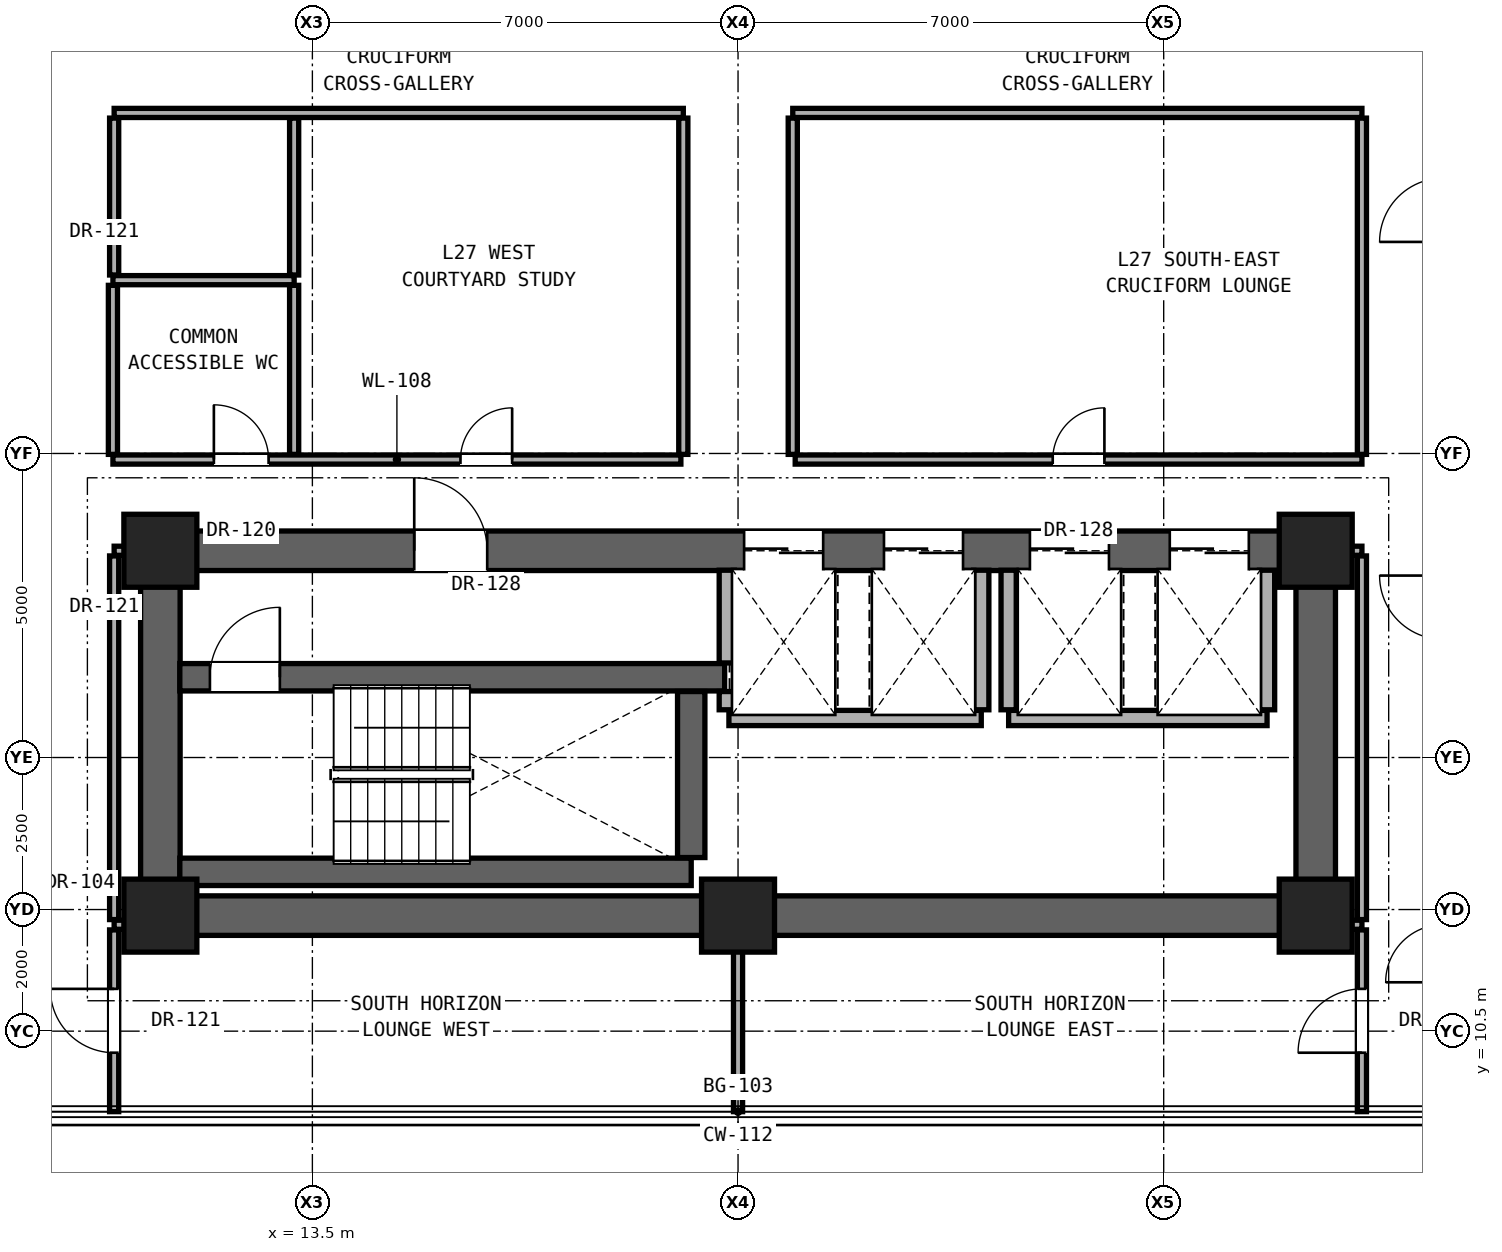
"""IFC4 building model, lengths in metres.
Left out: names, types, materials, properties, quantities, classifications, styles, units other than length and angle.
Written with IfcOpenShell. Run it as: python <this file> out.ifc"""

import sys

from ifc_helpers import new_model, si_unit, direction, frame, frame_2d, origin, origin_2d, place, context, subcontext, project, spatial, rectangle, extrude, element, fill, save


model = new_model("IFC4")
c1 = context("Model", 3, precision=1e-05, world=origin(), true_north=direction((0.0, 1.0)))
c2 = subcontext(c1, "Body", "Model", "MODEL_VIEW")
j1 = project(units=[si_unit("LENGTHUNIT", "METRE"), si_unit("PLANEANGLEUNIT", "RADIAN")], contexts=[c1])
p1 = place(None, origin())
s1 = spatial("IfcSite", under=j1, at=p1, CompositionType="ELEMENT")
p2 = place(p1, origin())
s2 = spatial("IfcBuilding", under=s1, at=p2, CompositionType="ELEMENT")
p3 = place(p2, frame((0.0, 0.0, 98.3)))
s3 = spatial("IfcBuildingStorey", under=s2, at=p3, CompositionType="ELEMENT", Elevation=98.3)
for number, where, z_axis, x_axis in (
    (1, (11.0, 12.4, 0.0), (0.0, 0.0, 1.0), (1.0, 0.0, 0.0)),
    (2, (20.5, 12.4, 0.0), (0.0, 0.0, 1.0), (1.0, 0.0, 0.0)),
    (3, (30.0, 12.4, 0.0), (0.0, 0.0, 1.0), (1.0, 0.0, 0.0)),
    (4, (11.0, 18.4, 0.0), (0.0, 0.0, 1.0), (1.0, 0.0, 0.0)),
    (5, (30.0, 18.4, 0.0), (0.0, 0.0, 1.0), (1.0, 0.0, 0.0)),
):
    element("IfcColumn", number, at=place(p3, frame(where, z_axis=z_axis, x_axis=x_axis)), inside=s3, PredefinedType="COLUMN", context=c2, shape_type="SweptSolid", body=[
        extrude(rectangle(XDim=1.2, YDim=1.2, at=origin_2d()), origin(), (0.0, 0.0, 1.0), 3.3),
    ])
p4 = place(p3, frame((11.0, 12.4, 0.0), z_axis=(0.0, 0.0, 1.0), x_axis=(1.0, 0.0, 0.0)))
e6 = element("IfcWall", 6, at=p4, inside=s3, PredefinedType="SHEAR", context=c2, shape_type="SweptSolid", body=[
    extrude(rectangle(XDim=19.0, YDim=0.65, at=frame_2d((9.5, 0.0))), origin(), (0.0, 0.0, 1.0), 3.08),
])
for number, where, z_axis, x_axis in (
    (7, (11.0, 12.4, 0.0), (0.0, 0.0, 1.0), (0.0, 1.0, 0.0)),
    (8, (30.0, 12.4, 0.0), (0.0, 0.0, 1.0), (0.0, 1.0, 0.0)),
):
    element("IfcWall", number, at=place(p3, frame(where, z_axis=z_axis, x_axis=x_axis)), inside=s3, PredefinedType="SHEAR", context=c2, shape_type="SweptSolid", body=[
        extrude(rectangle(XDim=6.0, YDim=0.65, at=frame_2d((3.0, 0.0))), origin(), (0.0, 0.0, 1.0), 3.08),
    ])
p5 = place(p3, frame((11.0, 18.4, 0.0), z_axis=(0.0, 0.0, 1.0), x_axis=(1.0, 0.0, 0.0)))
e9 = element("IfcWall", 9, at=p5, inside=s3, PredefinedType="SHEAR", context=c2, shape_type="SweptSolid", body=[
    extrude(rectangle(XDim=19.0, YDim=0.65, at=frame_2d((9.5, 0.0))), origin(), (0.0, 0.0, 1.0), 3.08),
])
p6 = place(p5, frame((4.175, 0.0, 0.0)))
e10 = element("IfcOpeningElement", 10, at=p6, cuts=e9, PredefinedType="OPENING", context=c2, shape_type="SweptSolid", body=[
    extrude(rectangle(XDim=1.2, YDim=2.25, at=frame_2d((0.6, 1.125))), frame((0.0, 0.335, 0.0), z_axis=(0.0, -1.0, 0.0), x_axis=(1.0, 0.0, 0.0)), (0.0, 0.0, 1.0), 0.67),
])
p7 = place(p5, frame((9.6, 0.0, 0.0)))
e11 = element("IfcOpeningElement", 11, at=p7, cuts=e9, PredefinedType="OPENING", context=c2, shape_type="SweptSolid", body=[
    extrude(rectangle(XDim=1.3, YDim=2.3, at=frame_2d((0.65, 1.15))), frame((0.0, 0.335, 0.0), z_axis=(0.0, -1.0, 0.0), x_axis=(1.0, 0.0, 0.0)), (0.0, 0.0, 1.0), 0.67),
])
p8 = place(p5, frame((11.9, 0.0, 0.0)))
e12 = element("IfcOpeningElement", 12, at=p8, cuts=e9, PredefinedType="OPENING", context=c2, shape_type="SweptSolid", body=[
    extrude(rectangle(XDim=1.3, YDim=2.3, at=frame_2d((0.65, 1.15))), frame((0.0, 0.335, 0.0), z_axis=(0.0, -1.0, 0.0), x_axis=(1.0, 0.0, 0.0)), (0.0, 0.0, 1.0), 0.67),
])
p9 = place(p5, frame((14.3, 0.0, 0.0)))
e13 = element("IfcOpeningElement", 13, at=p9, cuts=e9, PredefinedType="OPENING", context=c2, shape_type="SweptSolid", body=[
    extrude(rectangle(XDim=1.3, YDim=2.3, at=frame_2d((0.65, 1.15))), frame((0.0, 0.335, 0.0), z_axis=(0.0, -1.0, 0.0), x_axis=(1.0, 0.0, 0.0)), (0.0, 0.0, 1.0), 0.67),
])
p10 = place(p5, frame((16.6, 0.0, 0.0)))
e14 = element("IfcOpeningElement", 14, at=p10, cuts=e9, PredefinedType="OPENING", context=c2, shape_type="SweptSolid", body=[
    extrude(rectangle(XDim=1.3, YDim=2.3, at=frame_2d((0.65, 1.15))), frame((0.0, 0.335, 0.0), z_axis=(0.0, -1.0, 0.0), x_axis=(1.0, 0.0, 0.0)), (0.0, 0.0, 1.0), 0.67),
])
for number, where, z_axis, x_axis in (
    (15, (10.24, 12.25, 0.0), (0.0, 0.0, 1.0), (1.0, 0.0, 0.0)),
    (16, (30.32, 12.25, 0.0), (0.0, 0.0, 1.0), (1.0, 0.0, 0.0)),
):
    element("IfcWall", number, at=place(p3, frame(where, z_axis=z_axis, x_axis=x_axis)), inside=s3, PredefinedType="PARTITIONING", context=c2, shape_type="SweptSolid", body=[
        extrude(rectangle(XDim=0.44, YDim=0.15, at=frame_2d((0.22, 0.0))), origin(), (0.0, 0.0, 1.0), 3.08),
    ])
p11 = place(p3, frame((11.32, 13.12, 0.0), z_axis=(0.0, 0.0, 1.0), x_axis=(1.0, 0.0, 0.0)))
e17 = element("IfcWall", 17, at=p11, inside=s3, PredefinedType="SHEAR", context=c2, shape_type="SweptSolid", body=[
    extrude(rectangle(XDim=8.41, YDim=0.45, at=frame_2d((4.205, 0.0))), origin(), (0.0, 0.0, 1.0), 3.08),
])
p12 = place(p3, frame((20.35, 15.65, 0.0), z_axis=(0.0, 0.0, 1.0), x_axis=(1.0, 0.0, 0.0)))
e18 = element("IfcWall", 18, at=p12, inside=s3, PredefinedType="SOLIDWALL", context=c2, shape_type="SweptSolid", body=[
    extrude(rectangle(XDim=4.15, YDim=0.25, at=frame_2d((2.075, 0.0))), origin(), (0.0, 0.0, 1.0), 3.08),
])
p13 = place(p3, frame((24.95, 15.65, 0.0), z_axis=(0.0, 0.0, 1.0), x_axis=(1.0, 0.0, 0.0)))
e19 = element("IfcWall", 19, at=p13, inside=s3, PredefinedType="SOLIDWALL", context=c2, shape_type="SweptSolid", body=[
    extrude(rectangle(XDim=4.25, YDim=0.25, at=frame_2d((2.125, 0.0))), origin(), (0.0, 0.0, 1.0), 3.08),
])
p14 = place(p3, frame((11.32, 16.32, 0.0), z_axis=(0.0, 0.0, 1.0), x_axis=(1.0, 0.0, 0.0)))
e20 = element("IfcWall", 20, at=p14, inside=s3, PredefinedType="SHEAR", context=c2, shape_type="SweptSolid", body=[
    extrude(rectangle(XDim=8.96, YDim=0.45, at=frame_2d((4.48, 0.0))), origin(), (0.0, 0.0, 1.0), 3.08),
])
p15 = place(p14, frame((0.495, 0.0, 0.0)))
e21 = element("IfcOpeningElement", 21, at=p15, cuts=e20, PredefinedType="OPENING", context=c2, shape_type="SweptSolid", body=[
    extrude(rectangle(XDim=1.15, YDim=2.2, at=frame_2d((0.575, 1.1))), frame((0.0, 0.235, 0.0), z_axis=(0.0, -1.0, 0.0), x_axis=(1.0, 0.0, 0.0)), (0.0, 0.0, 1.0), 0.47),
])
for number, where, z_axis, x_axis in (
    (22, (10.24, 18.4, 0.0), (0.0, 0.0, 1.0), (1.0, 0.0, 0.0)),
    (23, (30.32, 18.4, 0.0), (0.0, 0.0, 1.0), (1.0, 0.0, 0.0)),
):
    element("IfcWall", number, at=place(p3, frame(where, z_axis=z_axis, x_axis=x_axis)), inside=s3, PredefinedType="PARTITIONING", context=c2, shape_type="SweptSolid", body=[
        extrude(rectangle(XDim=0.44, YDim=0.15, at=frame_2d((0.22, 0.0))), origin(), (0.0, 0.0, 1.0), 2.456),
    ])
p16 = place(p3, frame((10.22, 19.9, 0.0), z_axis=(0.0, 0.0, 1.0), x_axis=(1.0, 0.0, 0.0)))
e24 = element("IfcWall", 24, at=p16, inside=s3, PredefinedType="PARTITIONING", context=c2, shape_type="SweptSolid", body=[
    extrude(rectangle(XDim=9.34, YDim=0.15, at=frame_2d((4.67, 0.0))), origin(), (0.0, 0.0, 1.0), 2.124),
])
p17 = place(p16, frame((1.66, 0.0, 0.0)))
e25 = element("IfcOpeningElement", 25, at=p17, cuts=e24, PredefinedType="OPENING", context=c2, shape_type="SweptSolid", body=[
    extrude(rectangle(XDim=0.9, YDim=2.1, at=frame_2d((0.45, 1.05))), frame((0.0, 0.085, 0.0), z_axis=(0.0, -1.0, 0.0), x_axis=(1.0, 0.0, 0.0)), (0.0, 0.0, 1.0), 0.17),
])
p18 = place(p16, frame((5.715, 0.0, 0.0)))
e26 = element("IfcOpeningElement", 26, at=p18, cuts=e24, PredefinedType="OPENING", context=c2, shape_type="SweptSolid", body=[
    extrude(rectangle(XDim=0.85, YDim=2.01, at=frame_2d((0.425, 1.005))), frame((0.0, 0.085, 0.0), z_axis=(0.0, -1.0, 0.0), x_axis=(1.0, 0.0, 0.0)), (0.0, 0.0, 1.0), 0.17),
])
p19 = place(p3, frame((21.44, 19.9, 0.0), z_axis=(0.0, 0.0, 1.0), x_axis=(1.0, 0.0, 0.0)))
e27 = element("IfcWall", 27, at=p19, inside=s3, PredefinedType="PARTITIONING", context=c2, shape_type="SweptSolid", body=[
    extrude(rectangle(XDim=9.32, YDim=0.15, at=frame_2d((4.66, 0.0))), origin(), (0.0, 0.0, 1.0), 2.124),
])
p20 = place(p19, frame((4.235, 0.0, 0.0)))
e28 = element("IfcOpeningElement", 28, at=p20, cuts=e27, PredefinedType="OPENING", context=c2, shape_type="SweptSolid", body=[
    extrude(rectangle(XDim=0.85, YDim=2.01, at=frame_2d((0.425, 1.005))), frame((0.0, 0.085, 0.0), z_axis=(0.0, -1.0, 0.0), x_axis=(1.0, 0.0, 0.0)), (0.0, 0.0, 1.0), 0.17),
])
p21 = place(p3, frame((10.22, 22.85, 0.0), z_axis=(0.0, 0.0, 1.0), x_axis=(1.0, 0.0, 0.0)))
e29 = element("IfcWall", 29, at=p21, inside=s3, PredefinedType="PARTITIONING", context=c2, shape_type="SweptSolid", body=[
    extrude(rectangle(XDim=2.98, YDim=0.15, at=frame_2d((1.49, 0.0))), origin(), (0.0, 0.0, 1.0), 2.124),
])
for number, where, z_axis, x_axis in (
    (30, (10.24, 25.6, 0.0), (0.0, 0.0, 1.0), (1.0, 0.0, 0.0)),
    (31, (21.4, 25.6, 0.0), (0.0, 0.0, 1.0), (1.0, 0.0, 0.0)),
):
    element("IfcWall", number, at=place(p3, frame(where, z_axis=z_axis, x_axis=x_axis)), inside=s3, PredefinedType="PARTITIONING", context=c2, shape_type="SweptSolid", body=[
        extrude(rectangle(XDim=9.36, YDim=0.15, at=frame_2d((4.68, 0.0))), origin(), (0.0, 0.0, 1.0), 2.124),
    ])
p22 = place(p3, frame((10.22, 19.985, 0.0), z_axis=(0.0, 0.0, 1.0), x_axis=(0.0, 1.0, 0.0)))
e32 = element("IfcWall", 32, at=p22, inside=s3, PredefinedType="PARTITIONING", context=c2, shape_type="SweptSolid", body=[
    extrude(rectangle(XDim=2.78, YDim=0.15, at=frame_2d((1.39, 0.0))), origin(), (0.0, 0.0, 1.0), 3.08),
])
p23 = place(p3, frame((10.24, 9.176, 0.0), z_axis=(0.0, 0.0, 1.0), x_axis=(0.0, 1.0, 0.0)))
e33 = element("IfcWall", 33, at=p23, inside=s3, PredefinedType="PARTITIONING", context=c2, shape_type="SweptSolid", body=[
    extrude(rectangle(XDim=2.989, YDim=0.15, at=frame_2d((1.495, 0.0))), origin(), (0.0, 0.0, 1.0), 3.08),
])
p24 = place(p23, frame((0.969, 0.0, 0.0)))
e34 = element("IfcOpeningElement", 34, at=p24, cuts=e33, PredefinedType="OPENING", context=c2, shape_type="SweptSolid", body=[
    extrude(rectangle(XDim=1.05, YDim=2.2, at=frame_2d((0.525, 1.1))), frame((0.0, 0.085, 0.0), z_axis=(0.0, -1.0, 0.0), x_axis=(1.0, 0.0, 0.0)), (0.0, 0.0, 1.0), 0.17),
])
p25 = place(p3, frame((10.24, 12.335, 0.0), z_axis=(0.0, 0.0, 1.0), x_axis=(0.0, 1.0, 0.0)))
e35 = element("IfcWall", 35, at=p25, inside=s3, PredefinedType="PARTITIONING", context=c2, shape_type="SweptSolid", body=[
    extrude(rectangle(XDim=5.98, YDim=0.15, at=frame_2d((2.99, 0.0))), origin(), (0.0, 0.0, 1.0), 2.456),
])
p26 = place(p3, frame((10.24, 22.935, 0.0), z_axis=(0.0, 0.0, 1.0), x_axis=(0.0, 1.0, 0.0)))
e36 = element("IfcWall", 36, at=p26, inside=s3, PredefinedType="PARTITIONING", context=c2, shape_type="SweptSolid", body=[
    extrude(rectangle(XDim=2.58, YDim=0.15, at=frame_2d((1.29, 0.0))), origin(), (0.0, 0.0, 1.0), 2.299),
])
p27 = place(p3, frame((13.2, 19.985, 0.0), z_axis=(0.0, 0.0, 1.0), x_axis=(0.0, 1.0, 0.0)))
e37 = element("IfcWall", 37, at=p27, inside=s3, PredefinedType="PARTITIONING", context=c2, shape_type="SweptSolid", body=[
    extrude(rectangle(XDim=2.78, YDim=0.15, at=frame_2d((1.39, 0.0))), origin(), (0.0, 0.0, 1.0), 3.08),
])
p28 = place(p3, frame((13.2, 22.935, 0.0), z_axis=(0.0, 0.0, 1.0), x_axis=(0.0, 1.0, 0.0)))
e38 = element("IfcWall", 38, at=p28, inside=s3, PredefinedType="PARTITIONING", context=c2, shape_type="SweptSolid", body=[
    extrude(rectangle(XDim=2.58, YDim=0.15, at=frame_2d((1.29, 0.0))), origin(), (0.0, 0.0, 1.0), 2.124),
])
p29 = place(p3, frame((19.6, 19.985, 0.0), z_axis=(0.0, 0.0, 1.0), x_axis=(0.0, 1.0, 0.0)))
e39 = element("IfcWall", 39, at=p29, inside=s3, PredefinedType="PARTITIONING", context=c2, shape_type="SweptSolid", body=[
    extrude(rectangle(XDim=5.53, YDim=0.15, at=frame_2d((2.765, 0.0))), origin(), (0.0, 0.0, 1.0), 2.124),
])
p30 = place(p3, frame((19.73, 13.355, 0.0), z_axis=(0.0, 0.0, 1.0), x_axis=(0.0, 1.0, 0.0)))
e40 = element("IfcWall", 40, at=p30, inside=s3, PredefinedType="SHEAR", context=c2, shape_type="SweptSolid", body=[
    extrude(rectangle(XDim=2.73, YDim=0.45, at=frame_2d((1.365, 0.0))), origin(), (0.0, 0.0, 1.0), 3.08),
])
p31 = place(p3, frame((20.315, 15.785, 0.0), z_axis=(0.0, 0.0, 1.0), x_axis=(0.0, 1.0, 0.0)))
e41 = element("IfcWall", 41, at=p31, inside=s3, PredefinedType="SOLIDWALL", context=c2, shape_type="SweptSolid", body=[
    extrude(rectangle(XDim=0.3, YDim=0.25, at=frame_2d((0.15, 0.0))), origin(), (0.0, 0.0, 1.0), 3.08),
])
p32 = place(p3, frame((20.315, 16.555, 0.0), z_axis=(0.0, 0.0, 1.0), x_axis=(0.0, 1.0, 0.0)))
e42 = element("IfcWall", 42, at=p32, inside=s3, PredefinedType="SOLIDWALL", context=c2, shape_type="SweptSolid", body=[
    extrude(rectangle(XDim=1.525, YDim=0.25, at=frame_2d((0.763, 0.0))), origin(), (0.0, 0.0, 1.0), 3.08),
])
p33 = place(p3, frame((20.5, 9.176, 0.0), z_axis=(0.0, 0.0, 1.0), x_axis=(0.0, 1.0, 0.0)))
e43 = element("IfcWall", 43, at=p33, inside=s3, PredefinedType="PARTITIONING", context=c2, shape_type="SweptSolid", body=[
    extrude(rectangle(XDim=2.904, YDim=0.15, at=frame_2d((1.452, 0.0))), origin(), (0.0, 0.0, 1.0), 3.08),
])
p34 = place(p3, frame((21.4, 19.985, 0.0), z_axis=(0.0, 0.0, 1.0), x_axis=(0.0, 1.0, 0.0)))
e44 = element("IfcWall", 44, at=p34, inside=s3, PredefinedType="PARTITIONING", context=c2, shape_type="SweptSolid", body=[
    extrude(rectangle(XDim=5.53, YDim=0.15, at=frame_2d((2.765, 0.0))), origin(), (0.0, 0.0, 1.0), 2.124),
])
for number, where, z_axis, x_axis in (
    (45, (24.5, 15.785, 0.0), (0.0, 0.0, 1.0), (0.0, 1.0, 0.0)),
    (46, (24.95, 15.785, 0.0), (0.0, 0.0, 1.0), (0.0, 1.0, 0.0)),
    (47, (29.2, 15.785, 0.0), (0.0, 0.0, 1.0), (0.0, 1.0, 0.0)),
):
    element("IfcWall", number, at=place(p3, frame(where, z_axis=z_axis, x_axis=x_axis)), inside=s3, PredefinedType="SOLIDWALL", context=c2, shape_type="SweptSolid", body=[
        extrude(rectangle(XDim=2.295, YDim=0.25, at=frame_2d((1.147, 0.0))), origin(), (0.0, 0.0, 1.0), 3.08),
    ])
p35 = place(p3, frame((30.76, 9.176, 0.0), z_axis=(0.0, 0.0, 1.0), x_axis=(0.0, 1.0, 0.0)))
e48 = element("IfcWall", 48, at=p35, inside=s3, PredefinedType="PARTITIONING", context=c2, shape_type="SweptSolid", body=[
    extrude(rectangle(XDim=2.989, YDim=0.15, at=frame_2d((1.495, 0.0))), origin(), (0.0, 0.0, 1.0), 3.08),
])
p36 = place(p35, frame((0.969, 0.0, 0.0)))
e49 = element("IfcOpeningElement", 49, at=p36, cuts=e48, PredefinedType="OPENING", context=c2, shape_type="SweptSolid", body=[
    extrude(rectangle(XDim=1.05, YDim=2.2, at=frame_2d((0.525, 1.1))), frame((0.0, 0.085, 0.0), z_axis=(0.0, -1.0, 0.0), x_axis=(1.0, 0.0, 0.0)), (0.0, 0.0, 1.0), 0.17),
])
p37 = place(p3, frame((30.76, 12.335, 0.0), z_axis=(0.0, 0.0, 1.0), x_axis=(0.0, 1.0, 0.0)))
e50 = element("IfcWall", 50, at=p37, inside=s3, PredefinedType="PARTITIONING", context=c2, shape_type="SweptSolid", body=[
    extrude(rectangle(XDim=5.98, YDim=0.15, at=frame_2d((2.99, 0.0))), origin(), (0.0, 0.0, 1.0), 2.456),
])
p38 = place(p3, frame((30.76, 19.985, 0.0), z_axis=(0.0, 0.0, 1.0), x_axis=(0.0, 1.0, 0.0)))
e51 = element("IfcWall", 51, at=p38, inside=s3, PredefinedType="PARTITIONING", context=c2, shape_type="SweptSolid", body=[
    extrude(rectangle(XDim=5.53, YDim=0.15, at=frame_2d((2.765, 0.0))), origin(), (0.0, 0.0, 1.0), 2.299),
])
p39 = place(p6, origin())
e52 = element("IfcDoor", 52, at=p39, inside=s3, OperationType="SINGLE_SWING_LEFT", PredefinedType="DOOR", context=c2, shape_type="SweptSolid", body=[
    extrude(rectangle(XDim=1.2, YDim=2.25, at=frame_2d((0.6, 1.125))), frame((0.0, 0.025, 0.0), z_axis=(0.0, -1.0, 0.0), x_axis=(1.0, 0.0, 0.0)), (0.0, 0.0, 1.0), 0.05),
])
fill(e10, e52)
p40 = place(p15, origin())
e53 = element("IfcDoor", 53, at=p40, inside=s3, OperationType="SINGLE_SWING_RIGHT", PredefinedType="DOOR", context=c2, shape_type="SweptSolid", body=[
    extrude(rectangle(XDim=1.15, YDim=2.2, at=frame_2d((0.575, 1.1))), frame((0.0, 0.025, 0.0), z_axis=(0.0, -1.0, 0.0), x_axis=(1.0, 0.0, 0.0)), (0.0, 0.0, 1.0), 0.05),
])
fill(e21, e53)
p41 = place(p17, origin())
e54 = element("IfcDoor", 54, at=p41, inside=s3, OperationType="SINGLE_SWING_LEFT", PredefinedType="DOOR", context=c2, shape_type="SweptSolid", body=[
    extrude(rectangle(XDim=0.9, YDim=2.1, at=frame_2d((0.45, 1.05))), frame((0.0, 0.025, 0.0), z_axis=(0.0, -1.0, 0.0), x_axis=(1.0, 0.0, 0.0)), (0.0, 0.0, 1.0), 0.05),
])
fill(e25, e54)
p42 = place(p18, origin())
e55 = element("IfcDoor", 55, at=p42, inside=s3, OperationType="SINGLE_SWING_RIGHT", PredefinedType="DOOR", context=c2, shape_type="SweptSolid", body=[
    extrude(rectangle(XDim=0.85, YDim=2.01, at=frame_2d((0.425, 1.005))), frame((0.0, 0.025, 0.0), z_axis=(0.0, -1.0, 0.0), x_axis=(1.0, 0.0, 0.0)), (0.0, 0.0, 1.0), 0.05),
])
fill(e26, e55)
p43 = place(p20, origin())
e56 = element("IfcDoor", 56, at=p43, inside=s3, OperationType="SINGLE_SWING_RIGHT", PredefinedType="DOOR", context=c2, shape_type="SweptSolid", body=[
    extrude(rectangle(XDim=0.85, YDim=2.01, at=frame_2d((0.425, 1.005))), frame((0.0, 0.025, 0.0), z_axis=(0.0, -1.0, 0.0), x_axis=(1.0, 0.0, 0.0)), (0.0, 0.0, 1.0), 0.05),
])
fill(e28, e56)
p44 = place(p24, origin())
e57 = element("IfcDoor", 57, at=p44, inside=s3, OperationType="SINGLE_SWING_RIGHT", PredefinedType="DOOR", context=c2, shape_type="SweptSolid", body=[
    extrude(rectangle(XDim=1.05, YDim=2.2, at=frame_2d((0.525, 1.1))), frame((0.0, 0.025, 0.0), z_axis=(0.0, -1.0, 0.0), x_axis=(1.0, 0.0, 0.0)), (0.0, 0.0, 1.0), 0.05),
])
fill(e34, e57)
p45 = place(p36, origin())
e58 = element("IfcDoor", 58, at=p45, inside=s3, OperationType="SINGLE_SWING_LEFT", PredefinedType="DOOR", context=c2, shape_type="SweptSolid", body=[
    extrude(rectangle(XDim=1.05, YDim=2.2, at=frame_2d((0.525, 1.1))), frame((0.0, 0.025, 0.0), z_axis=(0.0, -1.0, 0.0), x_axis=(1.0, 0.0, 0.0)), (0.0, 0.0, 1.0), 0.05),
])
fill(e49, e58)
p46 = place(p7, origin())
e59 = element("IfcDoor", 59, at=p46, inside=s3, OperationType="DOUBLE_DOOR_SLIDING", PredefinedType="DOOR", context=c2, shape_type="SweptSolid", body=[
    extrude(rectangle(XDim=1.3, YDim=2.3, at=frame_2d((0.65, 1.15))), frame((0.0, 0.025, 0.0), z_axis=(0.0, -1.0, 0.0), x_axis=(1.0, 0.0, 0.0)), (0.0, 0.0, 1.0), 0.05),
])
fill(e11, e59)
p47 = place(p8, origin())
e60 = element("IfcDoor", 60, at=p47, inside=s3, OperationType="DOUBLE_DOOR_SLIDING", PredefinedType="DOOR", context=c2, shape_type="SweptSolid", body=[
    extrude(rectangle(XDim=1.3, YDim=2.3, at=frame_2d((0.65, 1.15))), frame((0.0, 0.025, 0.0), z_axis=(0.0, -1.0, 0.0), x_axis=(1.0, 0.0, 0.0)), (0.0, 0.0, 1.0), 0.05),
])
fill(e12, e60)
p48 = place(p9, origin())
e61 = element("IfcDoor", 61, at=p48, inside=s3, OperationType="DOUBLE_DOOR_SLIDING", PredefinedType="DOOR", context=c2, shape_type="SweptSolid", body=[
    extrude(rectangle(XDim=1.3, YDim=2.3, at=frame_2d((0.65, 1.15))), frame((0.0, 0.025, 0.0), z_axis=(0.0, -1.0, 0.0), x_axis=(1.0, 0.0, 0.0)), (0.0, 0.0, 1.0), 0.05),
])
fill(e13, e61)
p49 = place(p10, origin())
e62 = element("IfcDoor", 62, at=p49, inside=s3, OperationType="DOUBLE_DOOR_SLIDING", PredefinedType="DOOR", context=c2, shape_type="SweptSolid", body=[
    extrude(rectangle(XDim=1.3, YDim=2.3, at=frame_2d((0.65, 1.15))), frame((0.0, 0.025, 0.0), z_axis=(0.0, -1.0, 0.0), x_axis=(1.0, 0.0, 0.0)), (0.0, 0.0, 1.0), 0.05),
])
fill(e14, e62)
save(model, sys.argv[1])
